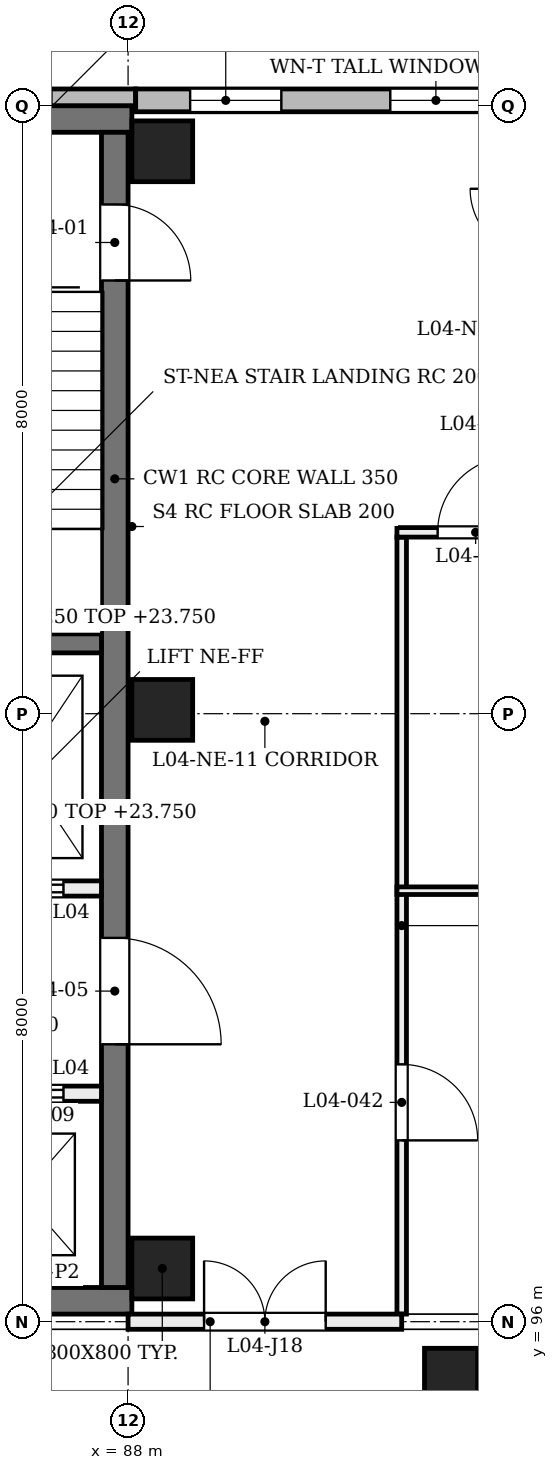
"""IFC4 building model, lengths in metres.
Left out: names, types, materials, properties, quantities, classifications, styles, units other than length and angle.
Written with IfcOpenShell. Run it as: python <this file> out.ifc"""

import sys

from ifc_helpers import new_model, si_unit, direction, frame, frame_2d, origin, origin_2d, place, context, subcontext, project, spatial, rectangle, extrude, element, fill, save


model = new_model("IFC4")
c1 = context("Model", 3, precision=1e-05, world=origin(), true_north=direction((0.0, 1.0)))
c2 = subcontext(c1, "Body", "Model", "MODEL_VIEW")
j1 = project(units=[si_unit("LENGTHUNIT", "METRE"), si_unit("PLANEANGLEUNIT", "RADIAN")], contexts=[c1])
p1 = place(None, origin())
s1 = spatial("IfcSite", under=j1, at=p1, CompositionType="ELEMENT")
p2 = place(p1, origin())
s2 = spatial("IfcBuilding", under=s1, at=p2, CompositionType="ELEMENT")
p3 = place(p2, frame((0.0, 0.0, 19.2)))
s3 = spatial("IfcBuildingStorey", under=s2, at=p3, CompositionType="ELEMENT", Elevation=19.2)
for number, where, z_axis, x_axis in (
    (1, (80.1, 96.275, 0.0), (0.0, 0.0, 1.0), (1.0, 0.0, 0.0)),
    (2, (80.1, 111.825, 0.0), (0.0, 0.0, 1.0), (1.0, 0.0, 0.0)),
):
    element("IfcWall", number, at=place(p3, frame(where, z_axis=z_axis, x_axis=x_axis)), inside=s3, PredefinedType="SHEAR", context=c2, shape_type="SweptSolid", body=[
        extrude(rectangle(XDim=7.95, YDim=0.35, at=frame_2d((3.975, 0.0))), origin(), (0.0, 0.0, 1.0), 4.58),
    ])
p4 = place(p3, frame((87.825, 96.45, 0.0), z_axis=(0.0, 0.0, 1.0), x_axis=(0.0, 1.0, 0.0)))
e3 = element("IfcWall", 3, at=p4, inside=s3, PredefinedType="SHEAR", context=c2, shape_type="SweptSolid", body=[
    extrude(rectangle(XDim=15.2, YDim=0.35, at=frame_2d((7.6, 0.0))), origin(), (0.0, 0.0, 1.0), 4.58),
])
p5 = place(p4, frame((13.25, 0.0, 0.0)))
e4 = element("IfcOpeningElement", 4, at=p5, cuts=e3, PredefinedType="OPENING", context=c2, shape_type="SweptSolid", body=[
    extrude(rectangle(XDim=1.0, YDim=2.1, at=frame_2d((0.5, 1.05))), frame((0.0, 0.185, 0.0), z_axis=(0.0, -1.0, 0.0), x_axis=(1.0, 0.0, 0.0)), (0.0, 0.0, 1.0), 0.37),
])
p6 = place(p4, frame((3.2, 0.0, 0.0)))
e5 = element("IfcOpeningElement", 5, at=p6, cuts=e3, PredefinedType="OPENING", context=c2, shape_type="SweptSolid", body=[
    extrude(rectangle(XDim=1.4, YDim=2.1, at=frame_2d((0.7, 1.05))), frame((0.0, 0.185, 0.0), z_axis=(0.0, -1.0, 0.0), x_axis=(1.0, 0.0, 0.0)), (0.0, 0.0, 1.0), 0.37),
])
for number, where, z_axis, x_axis in (
    (6, (88.45, 96.7, 0.0), (0.0, 0.0, 1.0), (1.0, 0.0, 0.0)),
    (7, (88.45, 104.05, 0.0), (0.0, 0.0, 1.0), (1.0, 0.0, 0.0)),
    (8, (88.45, 111.4, 0.0), (0.0, 0.0, 1.0), (1.0, 0.0, 0.0)),
):
    element("IfcColumn", number, at=place(p3, frame(where, z_axis=z_axis, x_axis=x_axis)), inside=s3, PredefinedType="COLUMN", context=c2, shape_type="SweptSolid", body=[
        extrude(rectangle(XDim=0.8, YDim=0.8, at=origin_2d()), origin(), (0.0, 0.0, 1.0), 4.8),
    ])
p7 = place(p3, frame((92.0, 95.3, 0.0), z_axis=(0.203937582782, 0.0, 0.978983892783), x_axis=(0.0, 1.0, 0.0)))
e9 = element("IfcColumn", 9, at=p7, inside=s3, PredefinedType="COLUMN", context=c2, shape_type="SweptSolid", body=[
    extrude(rectangle(XDim=0.7, YDim=0.7, at=origin_2d()), origin(), (0.0, 0.0, 1.0), 4.678),
])
p8 = place(p3, frame((79.9, 112.11, 0.0), z_axis=(0.0, 0.0, 1.0), x_axis=(1.0, 0.0, 0.0)))
e10 = element("IfcWall", 10, at=p8, inside=s3, PredefinedType="SOLIDWALL", context=c2, shape_type="SweptSolid", body=[
    extrude(rectangle(XDim=8.2, YDim=0.22, at=frame_2d((4.1, 0.0))), origin(), (0.0, 0.0, 1.0), 3.9),
])
p9 = place(p8, frame((1.308, 0.0, 0.9)))
e11 = element("IfcOpeningElement", 11, at=p9, cuts=e10, PredefinedType="OPENING", context=c2, shape_type="SweptSolid", body=[
    extrude(rectangle(XDim=0.45, YDim=2.6, at=frame_2d((0.225, 1.3))), frame((0.0, 0.12, 0.0), z_axis=(0.0, -1.0, 0.0), x_axis=(1.0, 0.0, 0.0)), (0.0, 0.0, 1.0), 0.24),
])
p10 = place(p8, frame((3.975, 0.0, 0.9)))
e12 = element("IfcOpeningElement", 12, at=p10, cuts=e10, PredefinedType="OPENING", context=c2, shape_type="SweptSolid", body=[
    extrude(rectangle(XDim=0.45, YDim=2.6, at=frame_2d((0.225, 1.3))), frame((0.0, 0.12, 0.0), z_axis=(0.0, -1.0, 0.0), x_axis=(1.0, 0.0, 0.0)), (0.0, 0.0, 1.0), 0.24),
])
p11 = place(p8, frame((6.642, 0.0, 0.9)))
e13 = element("IfcOpeningElement", 13, at=p11, cuts=e10, PredefinedType="OPENING", context=c2, shape_type="SweptSolid", body=[
    extrude(rectangle(XDim=0.45, YDim=2.6, at=frame_2d((0.225, 1.3))), frame((0.0, 0.12, 0.0), z_axis=(0.0, -1.0, 0.0), x_axis=(1.0, 0.0, 0.0)), (0.0, 0.0, 1.0), 0.24),
])
p12 = place(p3, frame((88.1, 112.07, 0.0), z_axis=(0.0, 0.0, 1.0), x_axis=(1.0, 0.0, 0.0)))
e14 = element("IfcWall", 14, at=p12, inside=s3, PredefinedType="SOLIDWALL", context=c2, shape_type="SweptSolid", body=[
    extrude(rectangle(XDim=7.9, YDim=0.3, at=frame_2d((3.95, 0.0))), origin(), (0.0, 0.0, 1.0), 3.9),
])
p13 = place(p12, frame((0.717, 0.0, 0.75)))
e15 = element("IfcOpeningElement", 15, at=p13, cuts=e14, PredefinedType="OPENING", context=c2, shape_type="SweptSolid", body=[
    extrude(rectangle(XDim=1.2, YDim=3.1, at=frame_2d((0.6, 1.55))), frame((0.0, 0.16, 0.0), z_axis=(0.0, -1.0, 0.0), x_axis=(1.0, 0.0, 0.0)), (0.0, 0.0, 1.0), 0.32),
])
p14 = place(p12, frame((3.35, 0.0, 0.75)))
e16 = element("IfcOpeningElement", 16, at=p14, cuts=e14, PredefinedType="OPENING", context=c2, shape_type="SweptSolid", body=[
    extrude(rectangle(XDim=1.2, YDim=3.1, at=frame_2d((0.6, 1.55))), frame((0.0, 0.16, 0.0), z_axis=(0.0, -1.0, 0.0), x_axis=(1.0, 0.0, 0.0)), (0.0, 0.0, 1.0), 0.32),
])
p15 = place(p12, frame((5.983, 0.0, 0.75)))
e17 = element("IfcOpeningElement", 17, at=p15, cuts=e14, PredefinedType="OPENING", context=c2, shape_type="SweptSolid", body=[
    extrude(rectangle(XDim=1.2, YDim=3.1, at=frame_2d((0.6, 1.55))), frame((0.0, 0.16, 0.0), z_axis=(0.0, -1.0, 0.0), x_axis=(1.0, 0.0, 0.0)), (0.0, 0.0, 1.0), 0.32),
])
p16 = place(p3, frame((87.65, 104.925, 0.0), z_axis=(0.0, 0.0, 1.0), x_axis=(-1.0, 0.0, 0.0)))
e18 = element("IfcWall", 18, at=p16, inside=s3, PredefinedType="SOLIDWALL", context=c2, shape_type="SweptSolid", body=[
    extrude(rectangle(XDim=3.1, YDim=0.25, at=frame_2d((1.55, 0.0))), origin(), (0.0, 0.0, 1.0), 4.55),
])
p17 = place(p3, frame((87.65, 101.7, 0.0), z_axis=(0.0, 0.0, 1.0), x_axis=(-1.0, 0.0, 0.0)))
e19 = element("IfcWall", 19, at=p17, inside=s3, PredefinedType="SOLIDWALL", context=c2, shape_type="SweptSolid", body=[
    extrude(rectangle(XDim=7.2, YDim=0.2, at=frame_2d((3.6, 0.0))), origin(), (0.0, 0.0, 1.0), 4.55),
])
p18 = place(p17, frame((0.5, 0.0, 0.0)))
e20 = element("IfcOpeningElement", 20, at=p18, cuts=e19, PredefinedType="OPENING", context=c2, shape_type="SweptSolid", body=[
    extrude(rectangle(XDim=1.1, YDim=2.1, at=frame_2d((0.55, 1.05))), frame((0.0, 0.11, 0.0), z_axis=(0.0, -1.0, 0.0), x_axis=(1.0, 0.0, 0.0)), (0.0, 0.0, 1.0), 0.22),
])
p19 = place(p17, frame((5.6, 0.0, 0.0)))
e21 = element("IfcOpeningElement", 21, at=p19, cuts=e19, PredefinedType="OPENING", context=c2, shape_type="SweptSolid", body=[
    extrude(rectangle(XDim=1.1, YDim=2.1, at=frame_2d((0.55, 1.05))), frame((0.0, 0.11, 0.0), z_axis=(0.0, -1.0, 0.0), x_axis=(1.0, 0.0, 0.0)), (0.0, 0.0, 1.0), 0.22),
])
p20 = place(p17, frame((3.1, 0.0, 0.0)))
e22 = element("IfcOpeningElement", 22, at=p20, cuts=e19, PredefinedType="OPENING", context=c2, shape_type="SweptSolid", body=[
    extrude(rectangle(XDim=1.0, YDim=2.1, at=frame_2d((0.5, 1.05))), frame((0.0, 0.11, 0.0), z_axis=(0.0, -1.0, 0.0), x_axis=(1.0, 0.0, 0.0)), (0.0, 0.0, 1.0), 0.22),
])
p21 = place(p3, frame((87.65, 99.0, 0.0), z_axis=(0.0, 0.0, 1.0), x_axis=(-1.0, 0.0, 0.0)))
e23 = element("IfcWall", 23, at=p21, inside=s3, PredefinedType="SOLIDWALL", context=c2, shape_type="SweptSolid", body=[
    extrude(rectangle(XDim=7.2, YDim=0.2, at=frame_2d((3.6, 0.0))), origin(), (0.0, 0.0, 1.0), 4.55),
])
p22 = place(p21, frame((0.5, 0.0, 0.0)))
e24 = element("IfcOpeningElement", 24, at=p22, cuts=e23, PredefinedType="OPENING", context=c2, shape_type="SweptSolid", body=[
    extrude(rectangle(XDim=1.1, YDim=2.1, at=frame_2d((0.55, 1.05))), frame((0.0, 0.11, 0.0), z_axis=(0.0, -1.0, 0.0), x_axis=(1.0, 0.0, 0.0)), (0.0, 0.0, 1.0), 0.22),
])
p23 = place(p21, frame((5.6, 0.0, 0.0)))
e25 = element("IfcOpeningElement", 25, at=p23, cuts=e23, PredefinedType="OPENING", context=c2, shape_type="SweptSolid", body=[
    extrude(rectangle(XDim=1.1, YDim=2.1, at=frame_2d((0.55, 1.05))), frame((0.0, 0.11, 0.0), z_axis=(0.0, -1.0, 0.0), x_axis=(1.0, 0.0, 0.0)), (0.0, 0.0, 1.0), 0.22),
])
p24 = place(p21, frame((3.1, 0.0, 0.0)))
e26 = element("IfcOpeningElement", 26, at=p24, cuts=e23, PredefinedType="OPENING", context=c2, shape_type="SweptSolid", body=[
    extrude(rectangle(XDim=1.0, YDim=2.1, at=frame_2d((0.5, 1.05))), frame((0.0, 0.11, 0.0), z_axis=(0.0, -1.0, 0.0), x_axis=(1.0, 0.0, 0.0)), (0.0, 0.0, 1.0), 0.22),
])
p25 = place(p3, frame((91.6, 96.1, 0.0), z_axis=(0.0, 0.0, 1.0), x_axis=(0.0, 1.0, 0.0)))
e27 = element("IfcWall", 27, at=p25, inside=s3, PredefinedType="PARTITIONING", context=c2, shape_type="SweptSolid", body=[
    extrude(rectangle(XDim=10.223, YDim=0.125, at=frame_2d((5.112, 0.0))), origin(), (0.0, 0.0, 1.0), 3.88),
])
p26 = place(p25, frame((2.286, 0.0, 0.0)))
e28 = element("IfcOpeningElement", 28, at=p26, cuts=e27, PredefinedType="OPENING", context=c2, shape_type="SweptSolid", body=[
    extrude(rectangle(XDim=1.0, YDim=2.1, at=frame_2d((0.5, 1.05))), frame((0.0, 0.073, 0.0), z_axis=(0.0, -1.0, 0.0), x_axis=(1.0, 0.0, 0.0)), (0.0, 0.0, 1.0), 0.145),
])
p27 = place(p3, frame((91.538, 101.671, 0.0), z_axis=(0.0, 0.0, 1.0), x_axis=(1.0, 0.0, 0.0)))
e29 = element("IfcWall", 29, at=p27, inside=s3, PredefinedType="PARTITIONING", context=c2, shape_type="SweptSolid", body=[
    extrude(rectangle(XDim=4.382, YDim=0.1, at=frame_2d((2.191, 0.0))), origin(), (0.0, 0.0, 1.0), 3.88),
])
p28 = place(p3, frame((91.538, 106.386, 0.0), z_axis=(0.0, 0.0, 1.0), x_axis=(1.0, 0.0, 0.0)))
e30 = element("IfcWall", 30, at=p28, inside=s3, PredefinedType="PARTITIONING", context=c2, shape_type="SweptSolid", body=[
    extrude(rectangle(XDim=1.925, YDim=0.125, at=frame_2d((0.962, 0.0))), origin(), (0.0, 0.0, 1.0), 4.56),
])
p29 = place(p28, frame((0.535, 0.0, 0.0)))
e31 = element("IfcOpeningElement", 31, at=p29, cuts=e30, PredefinedType="OPENING", context=c2, shape_type="SweptSolid", body=[
    extrude(rectangle(XDim=1.0, YDim=2.1, at=frame_2d((0.5, 1.05))), frame((0.0, 0.073, 0.0), z_axis=(0.0, -1.0, 0.0), x_axis=(1.0, 0.0, 0.0)), (0.0, 0.0, 1.0), 0.145),
])
p30 = place(p3, frame((88.0, 96.0, 0.0), z_axis=(0.0, 0.0, 1.0), x_axis=(1.0, 0.0, 0.0)))
e32 = element("IfcWall", 32, at=p30, inside=s3, PredefinedType="PARTITIONING", context=c2, shape_type="SweptSolid", body=[
    extrude(rectangle(XDim=3.6, YDim=0.2, at=frame_2d((1.8, 0.0))), origin(), (0.0, 0.0, 1.0), 3.88),
])
p31 = place(p30, frame((1.0, 0.0, 0.0)))
e33 = element("IfcOpeningElement", 33, at=p31, cuts=e32, PredefinedType="OPENING", context=c2, shape_type="SweptSolid", body=[
    extrude(rectangle(XDim=1.6, YDim=2.1, at=frame_2d((0.8, 1.05))), frame((0.0, 0.11, 0.0), z_axis=(0.0, -1.0, 0.0), x_axis=(1.0, 0.0, 0.0)), (0.0, 0.0, 1.0), 0.22),
])
p32 = place(p13, origin())
e34 = element("IfcWindow", 34, at=p32, inside=s3, PartitioningType="SINGLE_PANEL", PredefinedType="WINDOW", context=c2, shape_type="SweptSolid", body=[
    extrude(rectangle(XDim=1.2, YDim=3.1, at=frame_2d((0.6, 1.55))), frame((0.0, 0.03, 0.0), z_axis=(0.0, -1.0, 0.0), x_axis=(1.0, 0.0, 0.0)), (0.0, 0.0, 1.0), 0.06),
])
fill(e15, e34)
p33 = place(p14, origin())
e35 = element("IfcWindow", 35, at=p33, inside=s3, PartitioningType="SINGLE_PANEL", PredefinedType="WINDOW", context=c2, shape_type="SweptSolid", body=[
    extrude(rectangle(XDim=1.2, YDim=3.1, at=frame_2d((0.6, 1.55))), frame((0.0, 0.03, 0.0), z_axis=(0.0, -1.0, 0.0), x_axis=(1.0, 0.0, 0.0)), (0.0, 0.0, 1.0), 0.06),
])
fill(e16, e35)
p34 = place(p5, frame((1.0, 0.0, 0.0), z_axis=(0.0, 0.0, 1.0), x_axis=(-1.0, 0.0, 0.0)))
e36 = element("IfcDoor", 36, at=p34, inside=s3, OperationType="SINGLE_SWING_LEFT", PredefinedType="DOOR", context=c2, shape_type="SweptSolid", body=[
    extrude(rectangle(XDim=1.0, YDim=2.1, at=frame_2d((0.5, 1.05))), frame((0.0, 0.025, 0.0), z_axis=(0.0, -1.0, 0.0), x_axis=(1.0, 0.0, 0.0)), (0.0, 0.0, 1.0), 0.05),
])
fill(e4, e36)
p35 = place(p18, origin())
e37 = element("IfcDoor", 37, at=p35, inside=s3, OperationType="DOUBLE_DOOR_SLIDING", PredefinedType="DOOR", context=c2, shape_type="SweptSolid", body=[
    extrude(rectangle(XDim=1.1, YDim=2.1, at=frame_2d((0.55, 1.05))), frame((0.0, 0.025, 0.0), z_axis=(0.0, -1.0, 0.0), x_axis=(1.0, 0.0, 0.0)), (0.0, 0.0, 1.0), 0.05),
])
fill(e20, e37)
p36 = place(p22, frame((1.1, 0.0, 0.0), z_axis=(0.0, 0.0, 1.0), x_axis=(-1.0, 0.0, 0.0)))
e38 = element("IfcDoor", 38, at=p36, inside=s3, OperationType="DOUBLE_DOOR_SLIDING", PredefinedType="DOOR", context=c2, shape_type="SweptSolid", body=[
    extrude(rectangle(XDim=1.1, YDim=2.1, at=frame_2d((0.55, 1.05))), frame((0.0, 0.025, 0.0), z_axis=(0.0, -1.0, 0.0), x_axis=(1.0, 0.0, 0.0)), (0.0, 0.0, 1.0), 0.05),
])
fill(e24, e38)
p37 = place(p6, frame((1.4, 0.0, 0.0), z_axis=(0.0, 0.0, 1.0), x_axis=(-1.0, 0.0, 0.0)))
e39 = element("IfcDoor", 39, at=p37, inside=s3, OperationType="SINGLE_SWING_LEFT", PredefinedType="DOOR", context=c2, shape_type="SweptSolid", body=[
    extrude(rectangle(XDim=1.4, YDim=2.1, at=frame_2d((0.7, 1.05))), frame((0.0, 0.025, 0.0), z_axis=(0.0, -1.0, 0.0), x_axis=(1.0, 0.0, 0.0)), (0.0, 0.0, 1.0), 0.05),
])
fill(e5, e39)
p38 = place(p29, frame((1.0, 0.0, 0.0), z_axis=(0.0, 0.0, 1.0), x_axis=(-1.0, 0.0, 0.0)))
e40 = element("IfcDoor", 40, at=p38, inside=s3, OperationType="SINGLE_SWING_RIGHT", PredefinedType="DOOR", context=c2, shape_type="SweptSolid", body=[
    extrude(rectangle(XDim=1.0, YDim=2.1, at=frame_2d((0.5, 1.05))), frame((0.0, 0.025, 0.0), z_axis=(0.0, -1.0, 0.0), x_axis=(1.0, 0.0, 0.0)), (0.0, 0.0, 1.0), 0.05),
])
fill(e31, e40)
p39 = place(p26, frame((1.0, 0.0, 0.0), z_axis=(0.0, 0.0, 1.0), x_axis=(-1.0, 0.0, 0.0)))
e41 = element("IfcDoor", 41, at=p39, inside=s3, OperationType="SINGLE_SWING_LEFT", PredefinedType="DOOR", context=c2, shape_type="SweptSolid", body=[
    extrude(rectangle(XDim=1.0, YDim=2.1, at=frame_2d((0.5, 1.05))), frame((0.0, 0.025, 0.0), z_axis=(0.0, -1.0, 0.0), x_axis=(1.0, 0.0, 0.0)), (0.0, 0.0, 1.0), 0.05),
])
fill(e28, e41)
p40 = place(p31, origin())
e42 = element("IfcDoor", 42, at=p40, inside=s3, OperationType="DOUBLE_DOOR_SINGLE_SWING", PredefinedType="DOOR", context=c2, shape_type="SweptSolid", body=[
    extrude(rectangle(XDim=1.6, YDim=2.1, at=frame_2d((0.8, 1.05))), frame((0.0, 0.025, 0.0), z_axis=(0.0, -1.0, 0.0), x_axis=(1.0, 0.0, 0.0)), (0.0, 0.0, 1.0), 0.05),
])
fill(e33, e42)
save(model, sys.argv[1])
